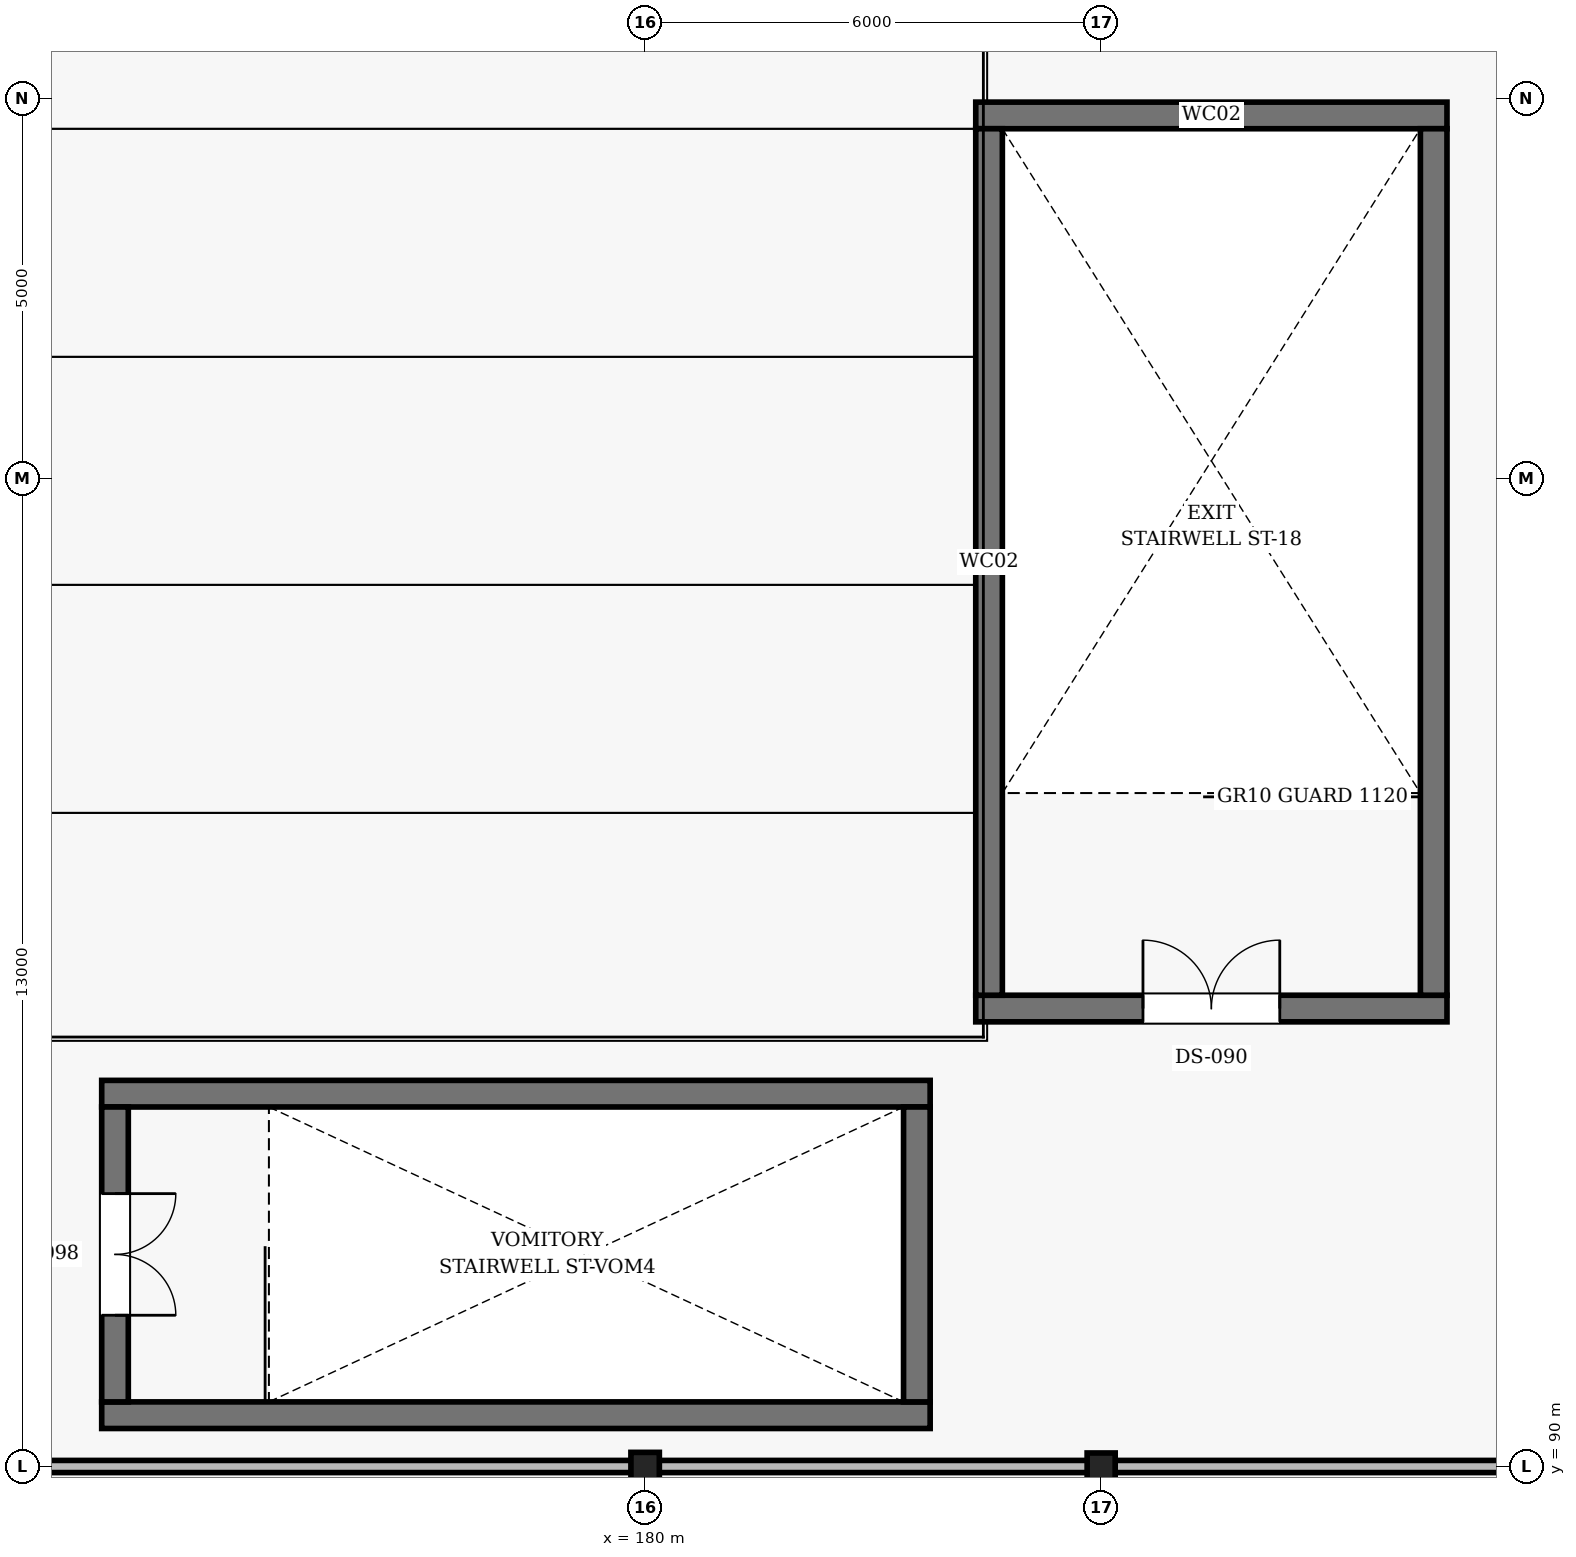
"""IFC4 building model, lengths in metres.
Left out: names, types, materials, properties, quantities, classifications, styles, units other than length and angle.
Written with IfcOpenShell. Run it as: python <this file> out.ifc"""

import sys

from ifc_helpers import new_model, si_unit, direction, frame, frame_2d, origin, origin_2d, place, context, subcontext, project, spatial, rectangle, i_section, extrude, element, fill, save


model = new_model("IFC4")
c1 = context("Model", 3, precision=1e-05, world=origin(), true_north=direction((0.0, 1.0)))
c2 = subcontext(c1, "Body", "Model", "MODEL_VIEW")
j1 = project(units=[si_unit("LENGTHUNIT", "METRE"), si_unit("PLANEANGLEUNIT", "RADIAN")], contexts=[c1])
p1 = place(None, origin())
s1 = spatial("IfcSite", under=j1, at=p1, CompositionType="ELEMENT")
p2 = place(p1, origin())
s2 = spatial("IfcBuilding", under=s1, at=p2, CompositionType="ELEMENT")
p3 = place(p2, frame((0.0, 0.0, 5.4)))
s3 = spatial("IfcBuildingStorey", under=s2, at=p3, CompositionType="ELEMENT", Elevation=5.4)
p4 = place(p3, frame((180.0, 90.0, 0.0), z_axis=(0.0, 0.0, 1.0), x_axis=(1.0, 0.0, 0.0)))
e1 = element("IfcColumn", 1, at=p4, inside=s3, PredefinedType="COLUMN", context=c2, shape_type="SweptSolid", body=[
    extrude(i_section(OverallWidth=0.374, OverallDepth=0.372, WebThickness=0.016, FlangeThickness=0.026, FilletRadius=0.016, at=origin_2d()), origin(), (0.0, 0.0, 1.0), 5.4),
])
p5 = place(p3, frame((186.0, 90.0, 0.0), z_axis=(0.0, 0.0, 1.0), x_axis=(1.0, 0.0, 0.0)))
e2 = element("IfcColumn", 2, at=p5, inside=s3, PredefinedType="COLUMN", context=c2, shape_type="SweptSolid", body=[
    extrude(i_section(OverallWidth=0.369, OverallDepth=0.356, WebThickness=0.011, FlangeThickness=0.018, FilletRadius=0.015, at=origin_2d()), origin(), (0.0, 0.0, 1.0), 5.4),
])
p6 = place(p3, frame((184.35, 96.025, 0.0), z_axis=(0.0, 0.0, 1.0), x_axis=(1.0, 0.0, 0.0)))
e3 = element("IfcWall", 3, at=p6, inside=s3, PredefinedType="SHEAR", context=c2, shape_type="SweptSolid", body=[
    extrude(rectangle(XDim=6.2, YDim=0.35, at=frame_2d((3.1, 0.0))), origin(), (0.0, 0.0, 1.0), 5.4),
])
p7 = place(p6, frame((2.2, 0.0, 0.0)))
e4 = element("IfcOpeningElement", 4, at=p7, cuts=e3, PredefinedType="OPENING", context=c2, shape_type="SweptSolid", body=[
    extrude(rectangle(XDim=1.8, YDim=2.2, at=frame_2d((0.9, 1.1))), frame((0.0, 0.185, 0.0), z_axis=(0.0, -1.0, 0.0), x_axis=(1.0, 0.0, 0.0)), (0.0, 0.0, 1.0), 0.37),
])
p8 = place(p3, frame((190.55, 107.775, 0.0), z_axis=(0.0, 0.0, 1.0), x_axis=(-1.0, 0.0, 0.0)))
e5 = element("IfcWall", 5, at=p8, inside=s3, PredefinedType="SHEAR", context=c2, shape_type="SweptSolid", body=[
    extrude(rectangle(XDim=6.2, YDim=0.35, at=frame_2d((3.1, 0.0))), origin(), (0.0, 0.0, 1.0), 5.4),
])
for number, where, z_axis, x_axis in (
    (6, (184.525, 107.6, 0.0), (0.0, 0.0, 1.0), (0.0, -1.0, 0.0)),
    (7, (190.375, 96.2, 0.0), (0.0, 0.0, 1.0), (0.0, 1.0, 0.0)),
):
    element("IfcWall", number, at=place(p3, frame(where, z_axis=z_axis, x_axis=x_axis)), inside=s3, PredefinedType="SHEAR", context=c2, shape_type="SweptSolid", body=[
        extrude(rectangle(XDim=11.4, YDim=0.35, at=frame_2d((5.7, 0.0))), origin(), (0.0, 0.0, 1.0), 5.4),
    ])
for number, where, z_axis, x_axis in (
    (8, (172.85, 90.675, 0.0), (0.0, 0.0, 1.0), (1.0, 0.0, 0.0)),
    (9, (183.75, 94.905, 0.0), (0.0, 0.0, 1.0), (-1.0, 0.0, 0.0)),
):
    element("IfcWall", number, at=place(p3, frame(where, z_axis=z_axis, x_axis=x_axis)), inside=s3, PredefinedType="SHEAR", context=c2, shape_type="SweptSolid", body=[
        extrude(rectangle(XDim=10.9, YDim=0.35, at=frame_2d((5.45, 0.0))), origin(), (0.0, 0.0, 1.0), 5.4),
    ])
p9 = place(p3, frame((173.025, 94.73, 0.0), z_axis=(0.0, 0.0, 1.0), x_axis=(0.0, -1.0, 0.0)))
e10 = element("IfcWall", 10, at=p9, inside=s3, PredefinedType="SHEAR", context=c2, shape_type="SweptSolid", body=[
    extrude(rectangle(XDim=3.88, YDim=0.35, at=frame_2d((1.94, 0.0))), origin(), (0.0, 0.0, 1.0), 5.4),
])
p10 = place(p9, frame((1.14, 0.0, 0.0)))
e11 = element("IfcOpeningElement", 11, at=p10, cuts=e10, PredefinedType="OPENING", context=c2, shape_type="SweptSolid", body=[
    extrude(rectangle(XDim=1.6, YDim=2.2, at=frame_2d((0.8, 1.1))), frame((0.0, 0.185, 0.0), z_axis=(0.0, -1.0, 0.0), x_axis=(1.0, 0.0, 0.0)), (0.0, 0.0, 1.0), 0.37),
])
p11 = place(p3, frame((183.575, 90.85, 0.0), z_axis=(0.0, 0.0, 1.0), x_axis=(0.0, 1.0, 0.0)))
e12 = element("IfcWall", 12, at=p11, inside=s3, PredefinedType="SHEAR", context=c2, shape_type="SweptSolid", body=[
    extrude(rectangle(XDim=3.88, YDim=0.35, at=frame_2d((1.94, 0.0))), origin(), (0.0, 0.0, 1.0), 5.4),
])
p12 = place(p3, frame((144.177, 90.0, 0.0), z_axis=(0.0, 0.0, 1.0), x_axis=(1.0, 0.0, 0.0)))
e13 = element("IfcWall", 13, at=p12, inside=s3, PredefinedType="PARTITIONING", context=c2, shape_type="SweptSolid", body=[
    extrude(rectangle(XDim=47.613, YDim=0.16, at=frame_2d((23.807, 0.0))), origin(), (0.0, 0.0, 1.0), 4.392),
])
p13 = place(p7, origin())
e14 = element("IfcDoor", 14, at=p13, inside=s3, OperationType="DOUBLE_DOOR_SINGLE_SWING", PredefinedType="DOOR", context=c2, shape_type="SweptSolid", body=[
    extrude(rectangle(XDim=1.8, YDim=2.2, at=frame_2d((0.9, 1.1))), frame((0.0, 0.025, 0.0), z_axis=(0.0, -1.0, 0.0), x_axis=(1.0, 0.0, 0.0)), (0.0, 0.0, 1.0), 0.05),
])
fill(e4, e14)
p14 = place(p10, origin())
e15 = element("IfcDoor", 15, at=p14, inside=s3, OperationType="DOUBLE_DOOR_SINGLE_SWING", PredefinedType="DOOR", context=c2, shape_type="SweptSolid", body=[
    extrude(rectangle(XDim=1.6, YDim=2.2, at=frame_2d((0.8, 1.1))), frame((0.0, 0.025, 0.0), z_axis=(0.0, -1.0, 0.0), x_axis=(1.0, 0.0, 0.0)), (0.0, 0.0, 1.0), 0.05),
])
fill(e11, e15)
save(model, sys.argv[1])
